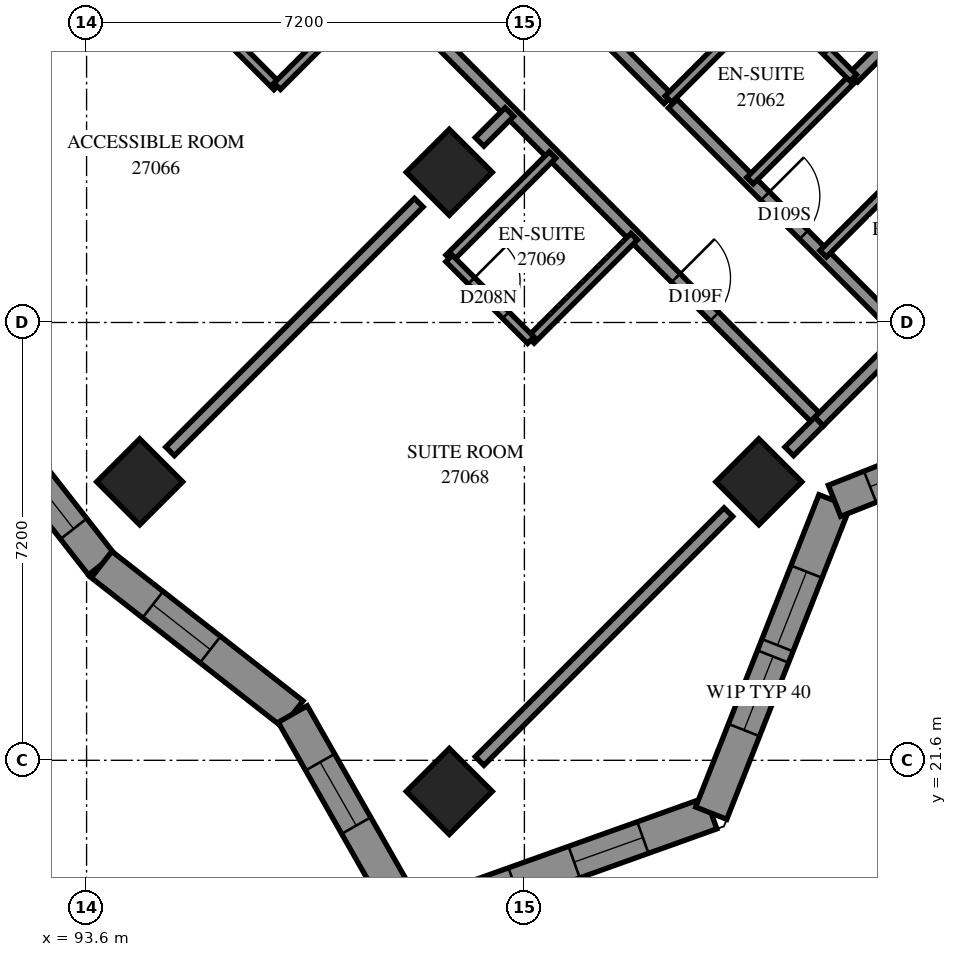
"""IFC4 building model, lengths in metres.
Left out: names, types, materials, properties, quantities, classifications, styles, units other than length and angle.
Written with IfcOpenShell. Run it as: python <this file> out.ifc"""

import sys

from ifc_helpers import new_model, si_unit, direction, frame, frame_2d, origin, origin_2d, place, context, subcontext, project, spatial, polyline, rectangle, outline, extrude, element, fill, save


model = new_model("IFC4")
c1 = context("Model", 3, precision=1e-05, world=origin(), true_north=direction((0.0, 1.0)))
c2 = subcontext(c1, "Body", "Model", "MODEL_VIEW")
j1 = project(units=[si_unit("LENGTHUNIT", "METRE"), si_unit("PLANEANGLEUNIT", "RADIAN")], contexts=[c1])
p1 = place(None, origin())
s1 = spatial("IfcSite", under=j1, at=p1, CompositionType="ELEMENT")
p2 = place(p1, origin())
s2 = spatial("IfcBuilding", under=s1, at=p2, CompositionType="ELEMENT")
p3 = place(p2, frame((0.0, 0.0, 101.6)))
s3 = spatial("IfcBuildingStorey", under=s2, at=p3, CompositionType="ELEMENT", Elevation=101.6)
for number, where, z_axis, x_axis in (
    (1, (99.565, 31.271, 0.0), (0.0, 0.0, 1.0), (0.707, -0.707, 0.0)),
    (2, (94.474, 26.18, 0.0), (0.0, 0.0, 1.0), (0.707, -0.707, 0.0)),
    (3, (104.656, 26.18, 0.0), (0.0, 0.0, 1.0), (0.707, -0.707, 0.0)),
    (4, (99.565, 21.088, 0.0), (0.0, 0.0, 1.0), (0.707, -0.707, 0.0)),
):
    element("IfcColumn", number, at=place(p3, frame(where, z_axis=z_axis, x_axis=x_axis)), inside=s3, PredefinedType="COLUMN", context=c2, shape_type="SweptSolid", body=[
        extrude(rectangle(XDim=1.0, YDim=1.0, at=origin_2d()), origin(), (0.0, 0.0, 1.0), 3.1),
    ])
p4 = place(p3, frame((98.924, 18.963, 0.0), z_axis=(0.0, 0.0, 1.0), x_axis=(0.9416454192, 0.3366064533, 0.0)))
e5 = element("IfcWall", 5, at=p4, inside=s3, PredefinedType="SOLIDWALL", context=c2, shape_type="SweptSolid", body=[
    extrude(outline(polyline([(-0.231, -0.275), (5.379, -0.275), (5.13, 0.275), (0.231, 0.275), (-0.231, -0.275)])), origin(), (0.0, 0.0, 1.0), 3.1),
])
p5 = place(p4, frame((0.611, 0.0, 0.5)))
e6 = element("IfcOpeningElement", 6, at=p5, cuts=e5, PredefinedType="OPENING", context=c2, shape_type="SweptSolid", body=[
    extrude(rectangle(XDim=1.2, YDim=2.45, at=frame_2d((0.6, 1.225))), frame((0.0, 0.285, 0.0), z_axis=(0.0, -1.0, 0.0), x_axis=(1.0, 0.0, 0.0)), (0.0, 0.0, 1.0), 0.57),
])
p6 = place(p4, frame((2.861, 0.0, 0.5)))
e7 = element("IfcOpeningElement", 7, at=p6, cuts=e5, PredefinedType="OPENING", context=c2, shape_type="SweptSolid", body=[
    extrude(rectangle(XDim=1.2, YDim=2.45, at=frame_2d((0.6, 1.225))), frame((0.0, 0.285, 0.0), z_axis=(0.0, -1.0, 0.0), x_axis=(1.0, 0.0, 0.0)), (0.0, 0.0, 1.0), 0.57),
])
p7 = place(p3, frame((103.872, 20.732, 0.0), z_axis=(0.0, 0.0, 1.0), x_axis=(0.3672341559, 0.9301285259, 0.0)))
e8 = element("IfcWall", 8, at=p7, inside=s3, PredefinedType="SOLIDWALL", context=c2, shape_type="SweptSolid", body=[
    extrude(outline(polyline([(-0.125, -0.275), (5.402, -0.275), (5.641, 0.275), (0.125, 0.275), (-0.125, -0.275)])), origin(), (0.0, 0.0, 1.0), 3.1),
])
p8 = place(p7, frame((1.469, 0.0, 0.5)))
e9 = element("IfcOpeningElement", 9, at=p8, cuts=e8, PredefinedType="OPENING", context=c2, shape_type="SweptSolid", body=[
    extrude(rectangle(XDim=1.3, YDim=2.45, at=frame_2d((0.65, 1.225))), frame((0.0, 0.285, 0.0), z_axis=(0.0, -1.0, 0.0), x_axis=(1.0, 0.0, 0.0)), (0.0, 0.0, 1.0), 0.57),
])
p9 = place(p7, frame((2.969, 0.0, 0.5)))
e10 = element("IfcOpeningElement", 10, at=p9, cuts=e8, PredefinedType="OPENING", context=c2, shape_type="SweptSolid", body=[
    extrude(rectangle(XDim=1.3, YDim=2.45, at=frame_2d((0.65, 1.225))), frame((0.0, 0.285, 0.0), z_axis=(0.0, -1.0, 0.0), x_axis=(1.0, 0.0, 0.0)), (0.0, 0.0, 1.0), 0.57),
])
p10 = place(p3, frame((105.9, 25.867, 0.0), z_axis=(0.0, 0.0, 1.0), x_axis=(0.9301285259, 0.3672341559, 0.0)))
e11 = element("IfcWall", 11, at=p10, inside=s3, PredefinedType="SOLIDWALL", context=c2, shape_type="SweptSolid", body=[
    extrude(outline(polyline([(0.119, -0.275), (5.646, -0.275), (5.397, 0.275), (-0.119, 0.275), (0.119, -0.275)])), origin(), (0.0, 0.0, 1.0), 3.1),
])
p11 = place(p10, frame((0.629, 0.0, 0.5)))
e12 = element("IfcOpeningElement", 12, at=p11, cuts=e11, PredefinedType="OPENING", context=c2, shape_type="SweptSolid", body=[
    extrude(rectangle(XDim=1.2, YDim=2.45, at=frame_2d((0.6, 1.225))), frame((0.0, 0.285, 0.0), z_axis=(0.0, -1.0, 0.0), x_axis=(1.0, 0.0, 0.0)), (0.0, 0.0, 1.0), 0.57),
])
p12 = place(p10, frame((3.127, 0.0, 0.5)))
e13 = element("IfcOpeningElement", 13, at=p12, cuts=e11, PredefinedType="OPENING", context=c2, shape_type="SweptSolid", body=[
    extrude(rectangle(XDim=1.2, YDim=2.45, at=frame_2d((0.6, 1.225))), frame((0.0, 0.285, 0.0), z_axis=(0.0, -1.0, 0.0), x_axis=(1.0, 0.0, 0.0)), (0.0, 0.0, 1.0), 0.57),
])
p13 = place(p3, frame((91.401, 27.947, 0.0), z_axis=(0.0, 0.0, 1.0), x_axis=(0.6160345176, -0.7877191588, 0.0)))
e14 = element("IfcWall", 14, at=p13, inside=s3, PredefinedType="SOLIDWALL", context=c2, shape_type="SweptSolid", body=[
    extrude(outline(polyline([(0.034, -0.275), (4.004, -0.275), (3.936, 0.275), (-0.034, 0.275), (0.034, -0.275)])), origin(), (0.0, 0.0, 1.0), 3.1),
])
p14 = place(p13, frame((0.424, 0.0, 0.5)))
e15 = element("IfcOpeningElement", 15, at=p14, cuts=e14, PredefinedType="OPENING", context=c2, shape_type="SweptSolid", body=[
    extrude(rectangle(XDim=1.3, YDim=2.45, at=frame_2d((0.65, 1.225))), frame((0.0, 0.285, 0.0), z_axis=(0.0, -1.0, 0.0), x_axis=(1.0, 0.0, 0.0)), (0.0, 0.0, 1.0), 0.57),
])
p15 = place(p13, frame((1.924, 0.0, 0.5)))
e16 = element("IfcOpeningElement", 16, at=p15, cuts=e14, PredefinedType="OPENING", context=c2, shape_type="SweptSolid", body=[
    extrude(rectangle(XDim=1.3, YDim=2.45, at=frame_2d((0.65, 1.225))), frame((0.0, 0.285, 0.0), z_axis=(0.0, -1.0, 0.0), x_axis=(1.0, 0.0, 0.0)), (0.0, 0.0, 1.0), 0.57),
])
p16 = place(p3, frame((93.847, 24.819, 0.0), z_axis=(0.0, 0.0, 1.0), x_axis=(0.7877370809, -0.6160116001, 0.0)))
e17 = element("IfcWall", 17, at=p16, inside=s3, PredefinedType="SOLIDWALL", context=c2, shape_type="SweptSolid", body=[
    extrude(outline(polyline([(-0.034, -0.275), (3.936, -0.275), (4.045, 0.275), (0.034, 0.275), (-0.034, -0.275)])), origin(), (0.0, 0.0, 1.0), 3.1),
])
p17 = place(p16, frame((1.069, 0.0, 0.5)))
e18 = element("IfcOpeningElement", 18, at=p17, cuts=e17, PredefinedType="OPENING", context=c2, shape_type="SweptSolid", body=[
    extrude(rectangle(XDim=1.2, YDim=2.45, at=frame_2d((0.6, 1.225))), frame((0.0, 0.285, 0.0), z_axis=(0.0, -1.0, 0.0), x_axis=(1.0, 0.0, 0.0)), (0.0, 0.0, 1.0), 0.57),
])
p18 = place(p3, frame((96.99, 22.361, 0.0), z_axis=(0.0, 0.0, 1.0), x_axis=(0.4946398394, -0.869098055, 0.0)))
e19 = element("IfcWall", 19, at=p18, inside=s3, PredefinedType="SOLIDWALL", context=c2, shape_type="SweptSolid", body=[
    extrude(outline(polyline([(0.054, -0.275), (4.141, -0.275), (3.679, 0.275), (-0.054, 0.275), (0.054, -0.275)])), origin(), (0.0, 0.0, 1.0), 3.1),
])
p19 = place(p18, frame((0.91, 0.0, 0.5)))
e20 = element("IfcOpeningElement", 20, at=p19, cuts=e19, PredefinedType="OPENING", context=c2, shape_type="SweptSolid", body=[
    extrude(rectangle(XDim=1.2, YDim=2.45, at=frame_2d((0.6, 1.225))), frame((0.0, 0.285, 0.0), z_axis=(0.0, -1.0, 0.0), x_axis=(1.0, 0.0, 0.0)), (0.0, 0.0, 1.0), 0.57),
])
p20 = place(p3, frame((92.004, 40.819, 0.0), z_axis=(0.0, 0.0, 1.0), x_axis=(0.7071067812, -0.7071067812, 0.0)))
e21 = element("IfcWall", 21, at=p20, inside=s3, PredefinedType="PARTITIONING", context=c2, shape_type="SweptSolid", body=[
    extrude(rectangle(XDim=19.298, YDim=0.2, at=frame_2d((9.649, 0.0))), origin(), (0.0, 0.0, 1.0), 3.1),
])
p21 = place(p20, frame((3.489, 0.0, 0.0)))
e22 = element("IfcOpeningElement", 22, at=p21, cuts=e21, PredefinedType="OPENING", context=c2, shape_type="SweptSolid", body=[
    extrude(rectangle(XDim=0.9, YDim=2.1, at=frame_2d((0.45, 1.05))), frame((0.0, 0.11, 0.0), z_axis=(0.0, -1.0, 0.0), x_axis=(1.0, 0.0, 0.0)), (0.0, 0.0, 1.0), 0.22),
])
p22 = place(p20, frame((9.319, 0.0, 0.0)))
e23 = element("IfcOpeningElement", 23, at=p22, cuts=e21, PredefinedType="OPENING", context=c2, shape_type="SweptSolid", body=[
    extrude(rectangle(XDim=0.9, YDim=2.1, at=frame_2d((0.45, 1.05))), frame((0.0, 0.11, 0.0), z_axis=(0.0, -1.0, 0.0), x_axis=(1.0, 0.0, 0.0)), (0.0, 0.0, 1.0), 0.22),
])
p23 = place(p20, frame((15.961, 0.0, 0.0)))
e24 = element("IfcOpeningElement", 24, at=p23, cuts=e21, PredefinedType="OPENING", context=c2, shape_type="SweptSolid", body=[
    extrude(rectangle(XDim=0.9, YDim=2.1, at=frame_2d((0.45, 1.05))), frame((0.0, 0.11, 0.0), z_axis=(0.0, -1.0, 0.0), x_axis=(1.0, 0.0, 0.0)), (0.0, 0.0, 1.0), 0.22),
])
p24 = place(p3, frame((89.881, 31.771, 0.0), z_axis=(0.0, 0.0, 1.0), x_axis=(0.7071067812, 0.7071067812, 0.0)))
e25 = element("IfcWall", 25, at=p24, inside=s3, PredefinedType="PARTITIONING", context=c2, shape_type="SweptSolid", body=[
    extrude(rectangle(XDim=5.787, YDim=0.2, at=frame_2d((2.893, 0.0))), origin(), (0.0, 0.0, 1.0), 3.1),
])
p25 = place(p3, frame((100.063, 21.589, 0.0), z_axis=(0.0, 0.0, 1.0), x_axis=(0.7071067812, 0.7071067812, 0.0)))
e26 = element("IfcWall", 26, at=p25, inside=s3, PredefinedType="PARTITIONING", context=c2, shape_type="SweptSolid", body=[
    extrude(rectangle(XDim=5.787, YDim=0.2, at=frame_2d((2.893, 0.0))), origin(), (0.0, 0.0, 1.0), 2.6),
])
p26 = place(p3, frame((94.973, 26.681, 0.0), z_axis=(0.0, 0.0, 1.0), x_axis=(0.7071067812, 0.7071067812, 0.0)))
e27 = element("IfcWall", 27, at=p26, inside=s3, PredefinedType="PARTITIONING", context=c2, shape_type="SweptSolid", body=[
    extrude(rectangle(XDim=5.784, YDim=0.2, at=frame_2d((2.892, 0.0))), origin(), (0.0, 0.0, 1.0), 3.1),
])
p27 = place(p3, frame((103.239, 32.399, 0.0), z_axis=(0.0, 0.0, 1.0), x_axis=(0.7071067812, -0.7071067812, 0.0)))
e28 = element("IfcWall", 28, at=p27, inside=s3, PredefinedType="PARTITIONING", context=c2, shape_type="SweptSolid", body=[
    extrude(rectangle(XDim=5.399, YDim=0.2, at=frame_2d((2.7, 0.0))), origin(), (0.0, 0.0, 1.0), 3.1),
])
p28 = place(p27, frame((2.15, 0.0, 0.0)))
e29 = element("IfcOpeningElement", 29, at=p28, cuts=e28, PredefinedType="OPENING", context=c2, shape_type="SweptSolid", body=[
    extrude(rectangle(XDim=0.9, YDim=2.1, at=frame_2d((0.45, 1.05))), frame((0.0, 0.11, 0.0), z_axis=(0.0, -1.0, 0.0), x_axis=(1.0, 0.0, 0.0)), (0.0, 0.0, 1.0), 0.22),
])
p29 = place(p3, frame((103.168, 32.47, 0.0), z_axis=(0.0, 0.0, 1.0), x_axis=(-0.7067858967, 0.7074275201, 0.0)))
e30 = element("IfcWall", 30, at=p29, inside=s3, PredefinedType="PARTITIONING", context=c2, shape_type="SweptSolid", body=[
    extrude(rectangle(XDim=5.299, YDim=0.2, at=frame_2d((2.65, 0.0))), origin(), (0.0, 0.0, 1.0), 3.1),
])
p30 = place(p29, frame((2.043, 0.0, 0.0)))
e31 = element("IfcOpeningElement", 31, at=p30, cuts=e30, PredefinedType="OPENING", context=c2, shape_type="SweptSolid", body=[
    extrude(rectangle(XDim=0.9, YDim=2.1, at=frame_2d((0.45, 1.05))), frame((0.0, 0.11, 0.0), z_axis=(0.0, -1.0, 0.0), x_axis=(1.0, 0.0, 0.0)), (0.0, 0.0, 1.0), 0.22),
])
p31 = place(p3, frame((106.211, 32.827, 0.0), z_axis=(0.0, 0.0, 1.0), x_axis=(0.7071067812, 0.7071067812, 0.0)))
e32 = element("IfcWall", 32, at=p31, inside=s3, PredefinedType="PARTITIONING", context=c2, shape_type="SweptSolid", body=[
    extrude(rectangle(XDim=4.45, YDim=0.2, at=frame_2d((2.225, 0.0))), origin(), (0.0, 0.0, 1.0), 3.1),
])
p32 = place(p3, frame((94.471, 34.945, 0.0), z_axis=(0.0, 0.0, 1.0), x_axis=(0.7067942478, -0.7074191764, 0.0)))
e33 = element("IfcWall", 33, at=p32, inside=s3, PredefinedType="PARTITIONING", context=c2, shape_type="SweptSolid", body=[
    extrude(rectangle(XDim=3.2, YDim=0.15, at=frame_2d((1.6, 0.0))), origin(), (0.0, 0.0, 1.0), 3.1),
])
p33 = place(p32, frame((1.206, 0.0, 0.0)))
e34 = element("IfcOpeningElement", 34, at=p33, cuts=e33, PredefinedType="OPENING", context=c2, shape_type="SweptSolid", body=[
    extrude(rectangle(XDim=0.8, YDim=2.1, at=frame_2d((0.4, 1.05))), frame((0.0, 0.085, 0.0), z_axis=(0.0, -1.0, 0.0), x_axis=(1.0, 0.0, 0.0)), (0.0, 0.0, 1.0), 0.17),
])
for number, where, z_axis, x_axis in (
    (35, (96.735, 32.685, 0.0), (0.0, 0.0, 1.0), (0.707, 0.707, 0.0)),
    (36, (103.169, 32.473, 0.0), (0.0, 0.0, 1.0), (0.707, 0.707, 0.0)),
    (37, (99.563, 29.857, 0.0), (0.0, 0.0, 1.0), (0.707, 0.707, 0.0)),
    (38, (100.907, 28.513, 0.0), (0.0, 0.0, 1.0), (0.707, 0.707, 0.0)),
):
    element("IfcWall", number, at=place(p3, frame(where, z_axis=z_axis, x_axis=x_axis)), inside=s3, PredefinedType="PARTITIONING", context=c2, shape_type="SweptSolid", body=[
        extrude(rectangle(XDim=2.401, YDim=0.15, at=frame_2d((1.201, 0.0))), origin(), (0.0, 0.0, 1.0), 3.1),
    ])
for number, where, z_axis, x_axis in (
    (39, (104.511, 31.133, 0.0), (0.0, 0.0, 1.0), (0.708, 0.707, 0.0)),
    (40, (105.713, 29.931, 0.0), (0.0, 0.0, 1.0), (0.708, 0.707, 0.0)),
):
    element("IfcWall", number, at=place(p3, frame(where, z_axis=z_axis, x_axis=x_axis)), inside=s3, PredefinedType="PARTITIONING", context=c2, shape_type="SweptSolid", body=[
        extrude(rectangle(XDim=2.4, YDim=0.15, at=frame_2d((1.2, 0.0))), origin(), (0.0, 0.0, 1.0), 3.1),
    ])
p34 = place(p3, frame((105.645, 27.171, 0.0), z_axis=(0.0, 0.0, 1.0), x_axis=(0.7071067812, 0.7071067812, 0.0)))
e41 = element("IfcWall", 41, at=p34, inside=s3, PredefinedType="PARTITIONING", context=c2, shape_type="SweptSolid", body=[
    extrude(rectangle(XDim=2.0, YDim=0.2, at=frame_2d((1.0, 0.0))), origin(), (0.0, 0.0, 1.0), 2.6),
])
p35 = place(p3, frame((99.561, 29.853, 0.0), z_axis=(0.0, 0.0, 1.0), x_axis=(0.7071067812, -0.7071067812, 0.0)))
e42 = element("IfcWall", 42, at=p35, inside=s3, PredefinedType="PARTITIONING", context=c2, shape_type="SweptSolid", body=[
    extrude(rectangle(XDim=1.901, YDim=0.15, at=frame_2d((0.95, 0.0))), origin(), (0.0, 0.0, 1.0), 3.1),
])
p36 = place(p35, frame((0.519, 0.0, 0.0)))
e43 = element("IfcOpeningElement", 43, at=p36, cuts=e42, PredefinedType="OPENING", context=c2, shape_type="SweptSolid", body=[
    extrude(rectangle(XDim=0.8, YDim=2.1, at=frame_2d((0.4, 1.05))), frame((0.0, 0.085, 0.0), z_axis=(0.0, -1.0, 0.0), x_axis=(1.0, 0.0, 0.0)), (0.0, 0.0, 1.0), 0.17),
])
p37 = place(p3, frame((104.865, 34.167, 0.0), z_axis=(0.0, 0.0, 1.0), x_axis=(0.7071067812, -0.7071067812, 0.0)))
e44 = element("IfcWall", 44, at=p37, inside=s3, PredefinedType="PARTITIONING", context=c2, shape_type="SweptSolid", body=[
    extrude(rectangle(XDim=1.901, YDim=0.15, at=frame_2d((0.95, 0.0))), origin(), (0.0, 0.0, 1.0), 3.1),
])
p38 = place(p37, frame((0.493, 0.0, 0.0)))
e45 = element("IfcOpeningElement", 45, at=p38, cuts=e44, PredefinedType="OPENING", context=c2, shape_type="SweptSolid", body=[
    extrude(rectangle(XDim=0.8, YDim=2.1, at=frame_2d((0.4, 1.05))), frame((0.0, 0.085, 0.0), z_axis=(0.0, -1.0, 0.0), x_axis=(1.0, 0.0, 0.0)), (0.0, 0.0, 1.0), 0.17),
])
p39 = place(p3, frame((105.155, 26.681, 0.0), z_axis=(0.0, 0.0, 1.0), x_axis=(0.7071067812, 0.7071067812, 0.0)))
e46 = element("IfcWall", 46, at=p39, inside=s3, PredefinedType="PARTITIONING", context=c2, shape_type="SweptSolid", body=[
    extrude(rectangle(XDim=0.693, YDim=0.2, at=frame_2d((0.346, 0.0))), origin(), (0.0, 0.0, 1.0), 2.6),
])
p40 = place(p3, frame((100.063, 31.771, 0.0), z_axis=(0.0, 0.0, 1.0), x_axis=(0.7071067812, 0.7071067812, 0.0)))
e47 = element("IfcWall", 47, at=p40, inside=s3, PredefinedType="PARTITIONING", context=c2, shape_type="SweptSolid", body=[
    extrude(rectangle(XDim=0.693, YDim=0.2, at=frame_2d((0.346, 0.0))), origin(), (0.0, 0.0, 1.0), 3.1),
])
p41 = place(p5, origin())
e48 = element("IfcWindow", 48, at=p41, inside=s3, PartitioningType="SINGLE_PANEL", PredefinedType="WINDOW", context=c2, shape_type="SweptSolid", body=[
    extrude(rectangle(XDim=1.2, YDim=2.45, at=frame_2d((0.6, 1.225))), frame((0.0, 0.155, 0.0), z_axis=(0.0, -1.0, 0.0), x_axis=(1.0, 0.0, 0.0)), (0.0, 0.0, 1.0), 0.06),
])
fill(e6, e48)
p42 = place(p6, origin())
e49 = element("IfcWindow", 49, at=p42, inside=s3, PartitioningType="SINGLE_PANEL", PredefinedType="WINDOW", context=c2, shape_type="SweptSolid", body=[
    extrude(rectangle(XDim=1.2, YDim=2.45, at=frame_2d((0.6, 1.225))), frame((0.0, 0.155, 0.0), z_axis=(0.0, -1.0, 0.0), x_axis=(1.0, 0.0, 0.0)), (0.0, 0.0, 1.0), 0.06),
])
fill(e7, e49)
p43 = place(p8, origin())
e50 = element("IfcWindow", 50, at=p43, inside=s3, PartitioningType="SINGLE_PANEL", PredefinedType="WINDOW", context=c2, shape_type="SweptSolid", body=[
    extrude(rectangle(XDim=1.3, YDim=2.45, at=frame_2d((0.65, 1.225))), frame((0.0, 0.155, 0.0), z_axis=(0.0, -1.0, 0.0), x_axis=(1.0, 0.0, 0.0)), (0.0, 0.0, 1.0), 0.06),
])
fill(e9, e50)
p44 = place(p9, origin())
e51 = element("IfcWindow", 51, at=p44, inside=s3, PartitioningType="SINGLE_PANEL", PredefinedType="WINDOW", context=c2, shape_type="SweptSolid", body=[
    extrude(rectangle(XDim=1.3, YDim=2.45, at=frame_2d((0.65, 1.225))), frame((0.0, 0.155, 0.0), z_axis=(0.0, -1.0, 0.0), x_axis=(1.0, 0.0, 0.0)), (0.0, 0.0, 1.0), 0.06),
])
fill(e10, e51)
p45 = place(p11, origin())
e52 = element("IfcWindow", 52, at=p45, inside=s3, PartitioningType="SINGLE_PANEL", PredefinedType="WINDOW", context=c2, shape_type="SweptSolid", body=[
    extrude(rectangle(XDim=1.2, YDim=2.45, at=frame_2d((0.6, 1.225))), frame((0.0, 0.155, 0.0), z_axis=(0.0, -1.0, 0.0), x_axis=(1.0, 0.0, 0.0)), (0.0, 0.0, 1.0), 0.06),
])
fill(e12, e52)
p46 = place(p15, origin())
e53 = element("IfcWindow", 53, at=p46, inside=s3, PartitioningType="SINGLE_PANEL", PredefinedType="WINDOW", context=c2, shape_type="SweptSolid", body=[
    extrude(rectangle(XDim=1.3, YDim=2.45, at=frame_2d((0.65, 1.225))), frame((0.0, 0.155, 0.0), z_axis=(0.0, -1.0, 0.0), x_axis=(1.0, 0.0, 0.0)), (0.0, 0.0, 1.0), 0.06),
])
fill(e16, e53)
p47 = place(p17, origin())
e54 = element("IfcWindow", 54, at=p47, inside=s3, PartitioningType="SINGLE_PANEL", PredefinedType="WINDOW", context=c2, shape_type="SweptSolid", body=[
    extrude(rectangle(XDim=1.2, YDim=2.45, at=frame_2d((0.6, 1.225))), frame((0.0, 0.155, 0.0), z_axis=(0.0, -1.0, 0.0), x_axis=(1.0, 0.0, 0.0)), (0.0, 0.0, 1.0), 0.06),
])
fill(e18, e54)
p48 = place(p19, origin())
e55 = element("IfcWindow", 55, at=p48, inside=s3, PartitioningType="SINGLE_PANEL", PredefinedType="WINDOW", context=c2, shape_type="SweptSolid", body=[
    extrude(rectangle(XDim=1.2, YDim=2.45, at=frame_2d((0.6, 1.225))), frame((0.0, 0.155, 0.0), z_axis=(0.0, -1.0, 0.0), x_axis=(1.0, 0.0, 0.0)), (0.0, 0.0, 1.0), 0.06),
])
fill(e20, e55)
p49 = place(p23, origin())
e56 = element("IfcDoor", 56, at=p49, inside=s3, OperationType="SINGLE_SWING_RIGHT", PredefinedType="DOOR", context=c2, shape_type="SweptSolid", body=[
    extrude(rectangle(XDim=0.9, YDim=2.1, at=frame_2d((0.45, 1.05))), frame((0.0, 0.025, 0.0), z_axis=(0.0, -1.0, 0.0), x_axis=(1.0, 0.0, 0.0)), (0.0, 0.0, 1.0), 0.05),
])
fill(e24, e56)
p50 = place(p36, origin())
e57 = element("IfcDoor", 57, at=p50, inside=s3, OperationType="SINGLE_SWING_RIGHT", PredefinedType="DOOR", context=c2, shape_type="SweptSolid", body=[
    extrude(rectangle(XDim=0.8, YDim=2.1, at=frame_2d((0.4, 1.05))), frame((0.0, 0.025, 0.0), z_axis=(0.0, -1.0, 0.0), x_axis=(1.0, 0.0, 0.0)), (0.0, 0.0, 1.0), 0.05),
])
fill(e43, e57)
p51 = place(p28, origin())
e58 = element("IfcDoor", 58, at=p51, inside=s3, OperationType="SINGLE_SWING_RIGHT", PredefinedType="DOOR", context=c2, shape_type="SweptSolid", body=[
    extrude(rectangle(XDim=0.9, YDim=2.1, at=frame_2d((0.45, 1.05))), frame((0.0, 0.025, 0.0), z_axis=(0.0, -1.0, 0.0), x_axis=(1.0, 0.0, 0.0)), (0.0, 0.0, 1.0), 0.05),
])
fill(e29, e58)
save(model, sys.argv[1])
